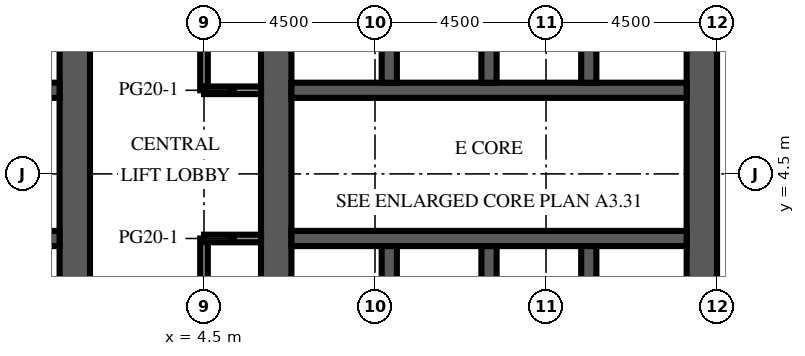
"""IFC4 building model, lengths in metres.
Left out: names, types, materials, properties, quantities, classifications, styles, units other than length and angle.
Written with IfcOpenShell. Run it as: python <this file> out.ifc"""

import sys

from ifc_helpers import new_model, si_unit, direction, frame, frame_2d, origin, place, context, subcontext, project, spatial, rectangle, extrude, element, fill, save


model = new_model("IFC4")
c1 = context("Model", 3, precision=1e-05, world=origin(), true_north=direction((0.0, 1.0)))
c2 = subcontext(c1, "Body", "Model", "MODEL_VIEW")
j1 = project(units=[si_unit("LENGTHUNIT", "METRE"), si_unit("PLANEANGLEUNIT", "RADIAN")], contexts=[c1])
p1 = place(None, origin())
s1 = spatial("IfcSite", under=j1, at=p1, CompositionType="ELEMENT")
p2 = place(p1, origin())
s2 = spatial("IfcBuilding", under=s1, at=p2, CompositionType="ELEMENT")
p3 = place(p2, frame((0.0, 0.0, 203.8)))
s3 = spatial("IfcBuildingStorey", under=s2, at=p3, CompositionType="ELEMENT", Elevation=203.8)
p4 = place(p3, frame((1.1, -9.0, 0.0), z_axis=(0.0, 0.0, 1.0), x_axis=(0.0, 1.0, 0.0)))
e1 = element("IfcWall", 1, at=p4, inside=s3, PredefinedType="SHEAR", context=c2, shape_type="SweptSolid", body=[
    extrude(rectangle(XDim=27.5, YDim=0.8, at=frame_2d((13.75, 0.0))), origin(), (0.0, 0.0, 1.0), 4.1),
])
p5 = place(p4, frame((12.55, 0.0, 0.0)))
e2 = element("IfcOpeningElement", 2, at=p5, cuts=e1, PredefinedType="OPENING", context=c2, shape_type="SweptSolid", body=[
    extrude(rectangle(XDim=2.4, YDim=2.4, at=frame_2d((1.2, 1.2))), frame((0.0, 0.41, 0.0), z_axis=(0.0, -1.0, 0.0), x_axis=(1.0, 0.0, 0.0)), (0.0, 0.0, 1.0), 0.82),
])
p6 = place(p4, frame((3.95, 0.0, 0.0)))
e3 = element("IfcOpeningElement", 3, at=p6, cuts=e1, PredefinedType="OPENING", context=c2, shape_type="SweptSolid", body=[
    extrude(rectangle(XDim=1.2, YDim=2.1, at=frame_2d((0.6, 1.05))), frame((0.0, 0.41, 0.0), z_axis=(0.0, -1.0, 0.0), x_axis=(1.0, 0.0, 0.0)), (0.0, 0.0, 1.0), 0.82),
])
p7 = place(p4, frame((22.35, 0.0, 0.0)))
e4 = element("IfcOpeningElement", 4, at=p7, cuts=e1, PredefinedType="OPENING", context=c2, shape_type="SweptSolid", body=[
    extrude(rectangle(XDim=1.2, YDim=2.1, at=frame_2d((0.6, 1.05))), frame((0.0, 0.41, 0.0), z_axis=(0.0, -1.0, 0.0), x_axis=(1.0, 0.0, 0.0)), (0.0, 0.0, 1.0), 0.82),
])
p8 = place(p3, frame((-9.7, 2.8, 0.0), z_axis=(0.0, 0.0, 1.0), x_axis=(1.0, 0.0, 0.0)))
e5 = element("IfcWall", 5, at=p8, inside=s3, PredefinedType="SHEAR", context=c2, shape_type="SweptSolid", body=[
    extrude(rectangle(XDim=10.4, YDim=0.4, at=frame_2d((5.2, 0.0))), origin(), (0.0, 0.0, 1.0), 4.1),
])
p9 = place(p8, frame((0.738, 0.0, 0.0)))
e6 = element("IfcOpeningElement", 6, at=p9, cuts=e5, PredefinedType="OPENING", context=c2, shape_type="SweptSolid", body=[
    extrude(rectangle(XDim=1.1, YDim=2.1, at=frame_2d((0.55, 1.05))), frame((0.0, 0.21, 0.0), z_axis=(0.0, -1.0, 0.0), x_axis=(1.0, 0.0, 0.0)), (0.0, 0.0, 1.0), 0.42),
])
p10 = place(p8, frame((3.337, 0.0, 0.0)))
e7 = element("IfcOpeningElement", 7, at=p10, cuts=e5, PredefinedType="OPENING", context=c2, shape_type="SweptSolid", body=[
    extrude(rectangle(XDim=1.1, YDim=2.1, at=frame_2d((0.55, 1.05))), frame((0.0, 0.21, 0.0), z_axis=(0.0, -1.0, 0.0), x_axis=(1.0, 0.0, 0.0)), (0.0, 0.0, 1.0), 0.42),
])
p11 = place(p8, frame((6.012, 0.0, 0.0)))
e8 = element("IfcOpeningElement", 8, at=p11, cuts=e5, PredefinedType="OPENING", context=c2, shape_type="SweptSolid", body=[
    extrude(rectangle(XDim=1.0, YDim=2.1, at=frame_2d((0.5, 1.05))), frame((0.0, 0.21, 0.0), z_axis=(0.0, -1.0, 0.0), x_axis=(1.0, 0.0, 0.0)), (0.0, 0.0, 1.0), 0.42),
])
p12 = place(p8, frame((8.613, 0.0, 0.0)))
e9 = element("IfcOpeningElement", 9, at=p12, cuts=e5, PredefinedType="OPENING", context=c2, shape_type="SweptSolid", body=[
    extrude(rectangle(XDim=1.0, YDim=2.1, at=frame_2d((0.5, 1.05))), frame((0.0, 0.21, 0.0), z_axis=(0.0, -1.0, 0.0), x_axis=(1.0, 0.0, 0.0)), (0.0, 0.0, 1.0), 0.42),
])
p13 = place(p3, frame((-9.7, 6.7, 0.0), z_axis=(0.0, 0.0, 1.0), x_axis=(1.0, 0.0, 0.0)))
e10 = element("IfcWall", 10, at=p13, inside=s3, PredefinedType="SHEAR", context=c2, shape_type="SweptSolid", body=[
    extrude(rectangle(XDim=10.4, YDim=0.4, at=frame_2d((5.2, 0.0))), origin(), (0.0, 0.0, 1.0), 4.1),
])
p14 = place(p13, frame((3.337, 0.0, 0.0)))
e11 = element("IfcOpeningElement", 11, at=p14, cuts=e10, PredefinedType="OPENING", context=c2, shape_type="SweptSolid", body=[
    extrude(rectangle(XDim=1.1, YDim=2.1, at=frame_2d((0.55, 1.05))), frame((0.0, 0.21, 0.0), z_axis=(0.0, -1.0, 0.0), x_axis=(1.0, 0.0, 0.0)), (0.0, 0.0, 1.0), 0.42),
])
p15 = place(p13, frame((5.962, 0.0, 0.0)))
e12 = element("IfcOpeningElement", 12, at=p15, cuts=e10, PredefinedType="OPENING", context=c2, shape_type="SweptSolid", body=[
    extrude(rectangle(XDim=1.1, YDim=2.1, at=frame_2d((0.55, 1.05))), frame((0.0, 0.21, 0.0), z_axis=(0.0, -1.0, 0.0), x_axis=(1.0, 0.0, 0.0)), (0.0, 0.0, 1.0), 0.42),
])
p16 = place(p13, frame((8.663, 0.0, 0.0)))
e13 = element("IfcOpeningElement", 13, at=p16, cuts=e10, PredefinedType="OPENING", context=c2, shape_type="SweptSolid", body=[
    extrude(rectangle(XDim=1.1, YDim=2.1, at=frame_2d((0.55, 1.05))), frame((0.0, 0.21, 0.0), z_axis=(0.0, -1.0, 0.0), x_axis=(1.0, 0.0, 0.0)), (0.0, 0.0, 1.0), 0.42),
])
p17 = place(p13, frame((0.688, 0.0, 0.0)))
e14 = element("IfcOpeningElement", 14, at=p17, cuts=e10, PredefinedType="OPENING", context=c2, shape_type="SweptSolid", body=[
    extrude(rectangle(XDim=1.0, YDim=2.1, at=frame_2d((0.5, 1.05))), frame((0.0, 0.21, 0.0), z_axis=(0.0, -1.0, 0.0), x_axis=(1.0, 0.0, 0.0)), (0.0, 0.0, 1.0), 0.42),
])
p18 = place(p3, frame((6.4, -9.0, 0.0), z_axis=(0.0, 0.0, 1.0), x_axis=(0.0, 1.0, 0.0)))
e15 = element("IfcWall", 15, at=p18, inside=s3, PredefinedType="SHEAR", context=c2, shape_type="SweptSolid", body=[
    extrude(rectangle(XDim=27.5, YDim=0.8, at=frame_2d((13.75, 0.0))), origin(), (0.0, 0.0, 1.0), 4.1),
])
p19 = place(p18, frame((12.55, 0.0, 0.0)))
e16 = element("IfcOpeningElement", 16, at=p19, cuts=e15, PredefinedType="OPENING", context=c2, shape_type="SweptSolid", body=[
    extrude(rectangle(XDim=2.4, YDim=2.4, at=frame_2d((1.2, 1.2))), frame((0.0, 0.41, 0.0), z_axis=(0.0, -1.0, 0.0), x_axis=(1.0, 0.0, 0.0)), (0.0, 0.0, 1.0), 0.82),
])
p20 = place(p18, frame((3.95, 0.0, 0.0)))
e17 = element("IfcOpeningElement", 17, at=p20, cuts=e15, PredefinedType="OPENING", context=c2, shape_type="SweptSolid", body=[
    extrude(rectangle(XDim=1.2, YDim=2.1, at=frame_2d((0.6, 1.05))), frame((0.0, 0.41, 0.0), z_axis=(0.0, -1.0, 0.0), x_axis=(1.0, 0.0, 0.0)), (0.0, 0.0, 1.0), 0.82),
])
p21 = place(p18, frame((22.35, 0.0, 0.0)))
e18 = element("IfcOpeningElement", 18, at=p21, cuts=e15, PredefinedType="OPENING", context=c2, shape_type="SweptSolid", body=[
    extrude(rectangle(XDim=1.2, YDim=2.1, at=frame_2d((0.6, 1.05))), frame((0.0, 0.41, 0.0), z_axis=(0.0, -1.0, 0.0), x_axis=(1.0, 0.0, 0.0)), (0.0, 0.0, 1.0), 0.82),
])
p22 = place(p3, frame((17.6, -9.0, 0.0), z_axis=(0.0, 0.0, 1.0), x_axis=(0.0, 1.0, 0.0)))
e19 = element("IfcWall", 19, at=p22, inside=s3, PredefinedType="SHEAR", context=c2, shape_type="SweptSolid", body=[
    extrude(rectangle(XDim=27.5, YDim=0.8, at=frame_2d((13.75, 0.0))), origin(), (0.0, 0.0, 1.0), 4.1),
])
p23 = place(p22, frame((12.55, 0.0, 0.0)))
e20 = element("IfcOpeningElement", 20, at=p23, cuts=e19, PredefinedType="OPENING", context=c2, shape_type="SweptSolid", body=[
    extrude(rectangle(XDim=2.4, YDim=2.4, at=frame_2d((1.2, 1.2))), frame((0.0, 0.41, 0.0), z_axis=(0.0, -1.0, 0.0), x_axis=(1.0, 0.0, 0.0)), (0.0, 0.0, 1.0), 0.82),
])
p24 = place(p22, frame((6.825, 0.0, 0.0)))
e21 = element("IfcOpeningElement", 21, at=p24, cuts=e19, PredefinedType="OPENING", context=c2, shape_type="SweptSolid", body=[
    extrude(rectangle(XDim=1.2, YDim=2.1, at=frame_2d((0.6, 1.05))), frame((0.0, 0.41, 0.0), z_axis=(0.0, -1.0, 0.0), x_axis=(1.0, 0.0, 0.0)), (0.0, 0.0, 1.0), 0.82),
])
p25 = place(p22, frame((19.475, 0.0, 0.0)))
e22 = element("IfcOpeningElement", 22, at=p25, cuts=e19, PredefinedType="OPENING", context=c2, shape_type="SweptSolid", body=[
    extrude(rectangle(XDim=1.2, YDim=2.1, at=frame_2d((0.6, 1.05))), frame((0.0, 0.41, 0.0), z_axis=(0.0, -1.0, 0.0), x_axis=(1.0, 0.0, 0.0)), (0.0, 0.0, 1.0), 0.82),
])
p26 = place(p3, frame((6.8, 2.8, 0.0), z_axis=(0.0, 0.0, 1.0), x_axis=(1.0, 0.0, 0.0)))
e23 = element("IfcWall", 23, at=p26, inside=s3, PredefinedType="SHEAR", context=c2, shape_type="SweptSolid", body=[
    extrude(rectangle(XDim=10.4, YDim=0.4, at=frame_2d((5.2, 0.0))), origin(), (0.0, 0.0, 1.0), 4.1),
])
p27 = place(p26, frame((0.738, 0.0, 0.0)))
e24 = element("IfcOpeningElement", 24, at=p27, cuts=e23, PredefinedType="OPENING", context=c2, shape_type="SweptSolid", body=[
    extrude(rectangle(XDim=1.1, YDim=2.1, at=frame_2d((0.55, 1.05))), frame((0.0, 0.21, 0.0), z_axis=(0.0, -1.0, 0.0), x_axis=(1.0, 0.0, 0.0)), (0.0, 0.0, 1.0), 0.42),
])
p28 = place(p26, frame((3.337, 0.0, 0.0)))
e25 = element("IfcOpeningElement", 25, at=p28, cuts=e23, PredefinedType="OPENING", context=c2, shape_type="SweptSolid", body=[
    extrude(rectangle(XDim=1.1, YDim=2.1, at=frame_2d((0.55, 1.05))), frame((0.0, 0.21, 0.0), z_axis=(0.0, -1.0, 0.0), x_axis=(1.0, 0.0, 0.0)), (0.0, 0.0, 1.0), 0.42),
])
p29 = place(p26, frame((6.012, 0.0, 0.0)))
e26 = element("IfcOpeningElement", 26, at=p29, cuts=e23, PredefinedType="OPENING", context=c2, shape_type="SweptSolid", body=[
    extrude(rectangle(XDim=1.0, YDim=2.1, at=frame_2d((0.5, 1.05))), frame((0.0, 0.21, 0.0), z_axis=(0.0, -1.0, 0.0), x_axis=(1.0, 0.0, 0.0)), (0.0, 0.0, 1.0), 0.42),
])
p30 = place(p26, frame((8.613, 0.0, 0.0)))
e27 = element("IfcOpeningElement", 27, at=p30, cuts=e23, PredefinedType="OPENING", context=c2, shape_type="SweptSolid", body=[
    extrude(rectangle(XDim=1.0, YDim=2.1, at=frame_2d((0.5, 1.05))), frame((0.0, 0.21, 0.0), z_axis=(0.0, -1.0, 0.0), x_axis=(1.0, 0.0, 0.0)), (0.0, 0.0, 1.0), 0.42),
])
p31 = place(p3, frame((6.8, 6.7, 0.0), z_axis=(0.0, 0.0, 1.0), x_axis=(1.0, 0.0, 0.0)))
e28 = element("IfcWall", 28, at=p31, inside=s3, PredefinedType="SHEAR", context=c2, shape_type="SweptSolid", body=[
    extrude(rectangle(XDim=10.4, YDim=0.4, at=frame_2d((5.2, 0.0))), origin(), (0.0, 0.0, 1.0), 4.1),
])
p32 = place(p31, frame((3.337, 0.0, 0.0)))
e29 = element("IfcOpeningElement", 29, at=p32, cuts=e28, PredefinedType="OPENING", context=c2, shape_type="SweptSolid", body=[
    extrude(rectangle(XDim=1.1, YDim=2.1, at=frame_2d((0.55, 1.05))), frame((0.0, 0.21, 0.0), z_axis=(0.0, -1.0, 0.0), x_axis=(1.0, 0.0, 0.0)), (0.0, 0.0, 1.0), 0.42),
])
p33 = place(p31, frame((5.962, 0.0, 0.0)))
e30 = element("IfcOpeningElement", 30, at=p33, cuts=e28, PredefinedType="OPENING", context=c2, shape_type="SweptSolid", body=[
    extrude(rectangle(XDim=1.1, YDim=2.1, at=frame_2d((0.55, 1.05))), frame((0.0, 0.21, 0.0), z_axis=(0.0, -1.0, 0.0), x_axis=(1.0, 0.0, 0.0)), (0.0, 0.0, 1.0), 0.42),
])
p34 = place(p31, frame((8.663, 0.0, 0.0)))
e31 = element("IfcOpeningElement", 31, at=p34, cuts=e28, PredefinedType="OPENING", context=c2, shape_type="SweptSolid", body=[
    extrude(rectangle(XDim=1.1, YDim=2.1, at=frame_2d((0.55, 1.05))), frame((0.0, 0.21, 0.0), z_axis=(0.0, -1.0, 0.0), x_axis=(1.0, 0.0, 0.0)), (0.0, 0.0, 1.0), 0.42),
])
p35 = place(p31, frame((0.688, 0.0, 0.0)))
e32 = element("IfcOpeningElement", 32, at=p35, cuts=e28, PredefinedType="OPENING", context=c2, shape_type="SweptSolid", body=[
    extrude(rectangle(XDim=1.0, YDim=2.1, at=frame_2d((0.5, 1.05))), frame((0.0, 0.21, 0.0), z_axis=(0.0, -1.0, 0.0), x_axis=(1.0, 0.0, 0.0)), (0.0, 0.0, 1.0), 0.42),
])
for number, where, z_axis, x_axis in (
    (33, (9.375, -0.3, 0.0), (0.0, 0.0, 1.0), (0.0, 1.0, 0.0)),
    (34, (9.375, 6.9, 0.0), (0.0, 0.0, 1.0), (0.0, 1.0, 0.0)),
    (35, (12.0, -0.3, 0.0), (0.0, 0.0, 1.0), (0.0, 1.0, 0.0)),
    (36, (12.0, 6.9, 0.0), (0.0, 0.0, 1.0), (0.0, 1.0, 0.0)),
    (37, (14.625, -0.3, 0.0), (0.0, 0.0, 1.0), (0.0, 1.0, 0.0)),
    (38, (14.625, 6.9, 0.0), (0.0, 0.0, 1.0), (0.0, 1.0, 0.0)),
):
    element("IfcWall", number, at=place(p3, frame(where, z_axis=z_axis, x_axis=x_axis)), inside=s3, PredefinedType="SHEAR", context=c2, shape_type="SweptSolid", body=[
        extrude(rectangle(XDim=2.9, YDim=0.4, at=frame_2d((1.45, 0.0))), origin(), (0.0, 0.0, 1.0), 4.1),
    ])
p36 = place(p3, frame((4.5, 2.8, 0.0), z_axis=(0.0, 0.0, 1.0), x_axis=(0.0, -1.0, 0.0)))
e39 = element("IfcWall", 39, at=p36, inside=s3, PredefinedType="PARTITIONING", context=c2, shape_type="SweptSolid", body=[
    extrude(rectangle(XDim=6.3, YDim=0.2, at=frame_2d((3.15, 0.0))), origin(), (0.0, 0.0, 1.0), 3.65),
])
p37 = place(p36, frame((2.45, 0.0, 0.0)))
e40 = element("IfcOpeningElement", 40, at=p37, cuts=e39, PredefinedType="OPENING", context=c2, shape_type="SweptSolid", body=[
    extrude(rectangle(XDim=1.0, YDim=2.1, at=frame_2d((0.5, 1.05))), frame((0.0, 0.11, 0.0), z_axis=(0.0, -1.0, 0.0), x_axis=(1.0, 0.0, 0.0)), (0.0, 0.0, 1.0), 0.22),
])
p38 = place(p3, frame((4.5, 18.5, 0.0), z_axis=(0.0, 0.0, 1.0), x_axis=(0.0, -1.0, 0.0)))
e41 = element("IfcWall", 41, at=p38, inside=s3, PredefinedType="PARTITIONING", context=c2, shape_type="SweptSolid", body=[
    extrude(rectangle(XDim=11.8, YDim=0.2, at=frame_2d((5.9, 0.0))), origin(), (0.0, 0.0, 1.0), 3.65),
])
p39 = place(p38, frame((6.45, 0.0, 0.0)))
e42 = element("IfcOpeningElement", 42, at=p39, cuts=e41, PredefinedType="OPENING", context=c2, shape_type="SweptSolid", body=[
    extrude(rectangle(XDim=1.0, YDim=2.1, at=frame_2d((0.5, 1.05))), frame((0.0, 0.11, 0.0), z_axis=(0.0, -1.0, 0.0), x_axis=(1.0, 0.0, 0.0)), (0.0, 0.0, 1.0), 0.22),
])
for number, where, z_axis, x_axis in (
    (43, (4.5, 2.8, 0.0), (0.0, 0.0, 1.0), (1.0, 0.0, 0.0)),
    (44, (4.5, 6.7, 0.0), (0.0, 0.0, 1.0), (1.0, 0.0, 0.0)),
):
    element("IfcWall", number, at=place(p3, frame(where, z_axis=z_axis, x_axis=x_axis)), inside=s3, PredefinedType="PARTITIONING", context=c2, shape_type="SweptSolid", body=[
        extrude(rectangle(XDim=1.5, YDim=0.2, at=frame_2d((0.75, 0.0))), origin(), (0.0, 0.0, 1.0), 3.65),
    ])
p40 = place(p27, origin())
e45 = element("IfcDoor", 45, at=p40, inside=s3, OperationType="DOUBLE_DOOR_SLIDING", PredefinedType="DOOR", context=c2, shape_type="SweptSolid", body=[
    extrude(rectangle(XDim=1.1, YDim=2.1, at=frame_2d((0.55, 1.05))), frame((0.0, 0.025, 0.0), z_axis=(0.0, -1.0, 0.0), x_axis=(1.0, 0.0, 0.0)), (0.0, 0.0, 1.0), 0.05),
])
fill(e24, e45)
p41 = place(p28, origin())
e46 = element("IfcDoor", 46, at=p41, inside=s3, OperationType="DOUBLE_DOOR_SLIDING", PredefinedType="DOOR", context=c2, shape_type="SweptSolid", body=[
    extrude(rectangle(XDim=1.1, YDim=2.1, at=frame_2d((0.55, 1.05))), frame((0.0, 0.025, 0.0), z_axis=(0.0, -1.0, 0.0), x_axis=(1.0, 0.0, 0.0)), (0.0, 0.0, 1.0), 0.05),
])
fill(e25, e46)
p42 = place(p32, origin())
e47 = element("IfcDoor", 47, at=p42, inside=s3, OperationType="DOUBLE_DOOR_SLIDING", PredefinedType="DOOR", context=c2, shape_type="SweptSolid", body=[
    extrude(rectangle(XDim=1.1, YDim=2.1, at=frame_2d((0.55, 1.05))), frame((0.0, 0.025, 0.0), z_axis=(0.0, -1.0, 0.0), x_axis=(1.0, 0.0, 0.0)), (0.0, 0.0, 1.0), 0.05),
])
fill(e29, e47)
p43 = place(p33, origin())
e48 = element("IfcDoor", 48, at=p43, inside=s3, OperationType="DOUBLE_DOOR_SLIDING", PredefinedType="DOOR", context=c2, shape_type="SweptSolid", body=[
    extrude(rectangle(XDim=1.1, YDim=2.1, at=frame_2d((0.55, 1.05))), frame((0.0, 0.025, 0.0), z_axis=(0.0, -1.0, 0.0), x_axis=(1.0, 0.0, 0.0)), (0.0, 0.0, 1.0), 0.05),
])
fill(e30, e48)
p44 = place(p34, origin())
e49 = element("IfcDoor", 49, at=p44, inside=s3, OperationType="DOUBLE_DOOR_SLIDING", PredefinedType="DOOR", context=c2, shape_type="SweptSolid", body=[
    extrude(rectangle(XDim=1.1, YDim=2.1, at=frame_2d((0.55, 1.05))), frame((0.0, 0.025, 0.0), z_axis=(0.0, -1.0, 0.0), x_axis=(1.0, 0.0, 0.0)), (0.0, 0.0, 1.0), 0.05),
])
fill(e31, e49)
p45 = place(p5, origin())
e50 = element("IfcDoor", 50, at=p45, inside=s3, OperationType="DOUBLE_DOOR_DOUBLE_SWING", PredefinedType="DOOR", context=c2, shape_type="SweptSolid", body=[
    extrude(rectangle(XDim=2.4, YDim=2.4, at=frame_2d((1.2, 1.2))), frame((0.0, 0.025, 0.0), z_axis=(0.0, -1.0, 0.0), x_axis=(1.0, 0.0, 0.0)), (0.0, 0.0, 1.0), 0.05),
])
fill(e2, e50)
p46 = place(p19, origin())
e51 = element("IfcDoor", 51, at=p46, inside=s3, OperationType="DOUBLE_DOOR_DOUBLE_SWING", PredefinedType="DOOR", context=c2, shape_type="SweptSolid", body=[
    extrude(rectangle(XDim=2.4, YDim=2.4, at=frame_2d((1.2, 1.2))), frame((0.0, 0.025, 0.0), z_axis=(0.0, -1.0, 0.0), x_axis=(1.0, 0.0, 0.0)), (0.0, 0.0, 1.0), 0.05),
])
fill(e16, e51)
p47 = place(p23, origin())
e52 = element("IfcDoor", 52, at=p47, inside=s3, OperationType="DOUBLE_DOOR_DOUBLE_SWING", PredefinedType="DOOR", context=c2, shape_type="SweptSolid", body=[
    extrude(rectangle(XDim=2.4, YDim=2.4, at=frame_2d((1.2, 1.2))), frame((0.0, 0.025, 0.0), z_axis=(0.0, -1.0, 0.0), x_axis=(1.0, 0.0, 0.0)), (0.0, 0.0, 1.0), 0.05),
])
fill(e20, e52)
p48 = place(p29, origin())
e53 = element("IfcDoor", 53, at=p48, inside=s3, OperationType="SINGLE_SWING_LEFT", PredefinedType="DOOR", context=c2, shape_type="SweptSolid", body=[
    extrude(rectangle(XDim=1.0, YDim=2.1, at=frame_2d((0.5, 1.05))), frame((0.0, 0.025, 0.0), z_axis=(0.0, -1.0, 0.0), x_axis=(1.0, 0.0, 0.0)), (0.0, 0.0, 1.0), 0.05),
])
fill(e26, e53)
p49 = place(p30, origin())
e54 = element("IfcDoor", 54, at=p49, inside=s3, OperationType="SINGLE_SWING_RIGHT", PredefinedType="DOOR", context=c2, shape_type="SweptSolid", body=[
    extrude(rectangle(XDim=1.0, YDim=2.1, at=frame_2d((0.5, 1.05))), frame((0.0, 0.025, 0.0), z_axis=(0.0, -1.0, 0.0), x_axis=(1.0, 0.0, 0.0)), (0.0, 0.0, 1.0), 0.05),
])
fill(e27, e54)
p50 = place(p35, origin())
e55 = element("IfcDoor", 55, at=p50, inside=s3, OperationType="SINGLE_SWING_LEFT", PredefinedType="DOOR", context=c2, shape_type="SweptSolid", body=[
    extrude(rectangle(XDim=1.0, YDim=2.1, at=frame_2d((0.5, 1.05))), frame((0.0, 0.025, 0.0), z_axis=(0.0, -1.0, 0.0), x_axis=(1.0, 0.0, 0.0)), (0.0, 0.0, 1.0), 0.05),
])
fill(e32, e55)
save(model, sys.argv[1])
